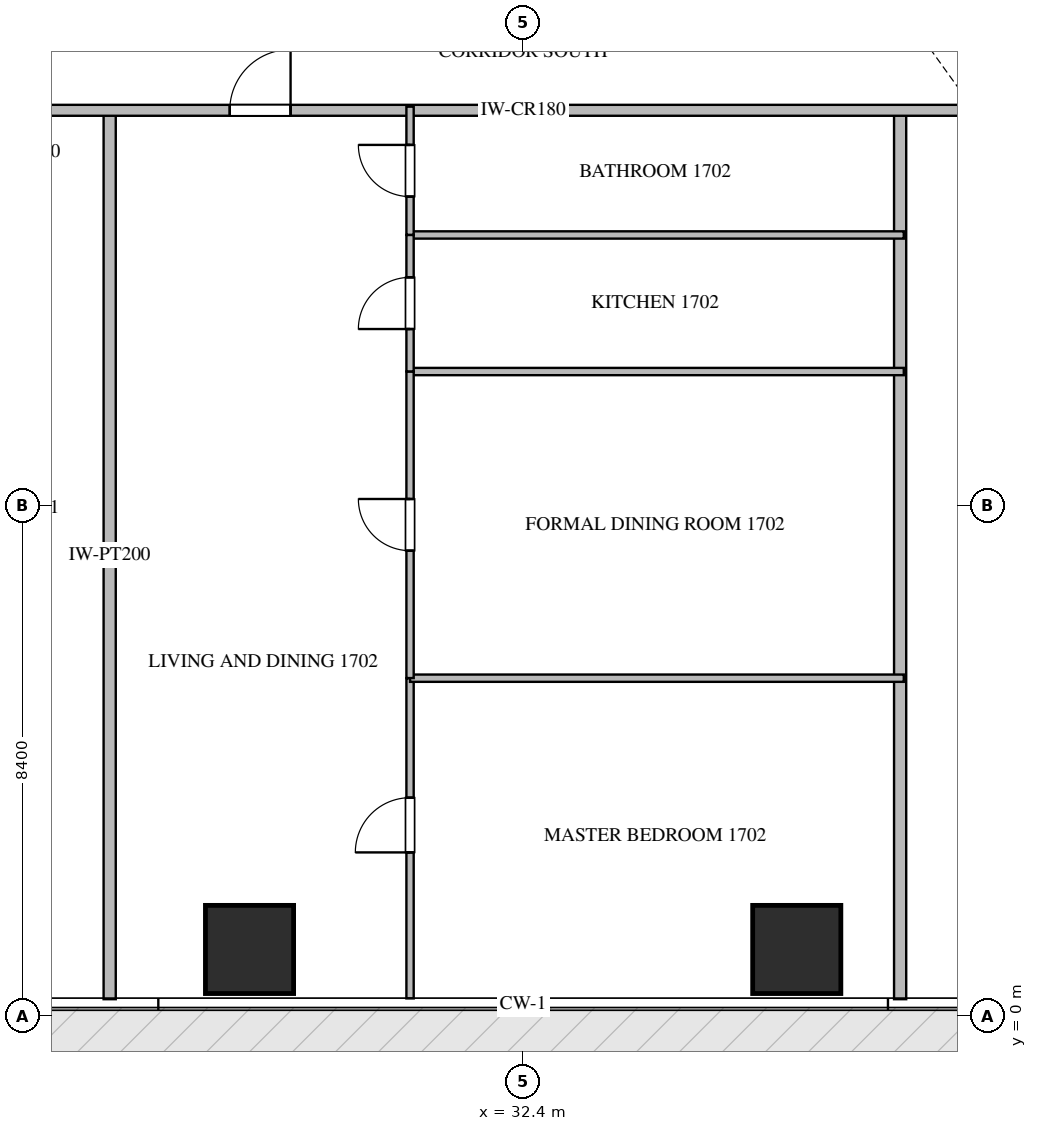
"""IFC4 building model, lengths in metres.
Left out: names, types, materials, properties, quantities, classifications, styles, units other than length and angle.
Written with IfcOpenShell. Run it as: python <this file> out.ifc"""

import sys

from ifc_helpers import new_model, si_unit, direction, frame, frame_2d, origin, origin_2d, place, context, subcontext, project, spatial, rectangle, extrude, source, transform, mapped, element, fill, save


model = new_model("IFC4")
c1 = context("Model", 3, precision=1e-05, world=origin(), true_north=direction((0.0, 1.0)))
c2 = subcontext(c1, "Body", "Model", "MODEL_VIEW")
j1 = project(units=[si_unit("LENGTHUNIT", "METRE"), si_unit("PLANEANGLEUNIT", "RADIAN")], contexts=[c1])
p1 = place(None, origin())
s1 = spatial("IfcSite", under=j1, at=p1, CompositionType="ELEMENT")
p2 = place(p1, origin())
s2 = spatial("IfcBuilding", under=s1, at=p2, CompositionType="ELEMENT")
p3 = place(p2, frame((0.0, 0.0, 71.7)))
s3 = spatial("IfcBuildingStorey", under=s2, at=p3, CompositionType="ELEMENT", Elevation=71.7)
m1 = source(origin(), c2, "Body", "SweptSolid", [
    extrude(rectangle(XDim=1.45, YDim=1.45, at=origin_2d()), origin(), (0.0, 0.0, 1.0), 3.75),
])
for number, where, z_axis, x_axis in (
    (1, (27.9, 1.1, -0.26), (0.0, 0.0, 1.0), (1.0, 0.0, 0.0)),
    (2, (36.9, 1.1, -0.26), (0.0, 0.0, 1.0), (1.0, 0.0, 0.0)),
):
    element("IfcColumn", number, at=place(p3, frame(where, z_axis=z_axis, x_axis=x_axis)), inside=s3, PredefinedType="COLUMN", context=c2, shape_type="MappedRepresentation", body=[
        mapped(m1, transform((0.0, 0.0, 0.0), scale=1.0)),
    ])
for number, where, z_axis, x_axis in (
    (3, (25.6, 0.282, 0.0), (0.0, 0.0, 1.0), (0.0, 1.0, 0.0)),
    (4, (38.6, 0.282, 0.0), (0.0, 0.0, 1.0), (0.0, 1.0, 0.0)),
):
    element("IfcWall", number, at=place(p3, frame(where, z_axis=z_axis, x_axis=x_axis)), inside=s3, PredefinedType="PARTITIONING", context=c2, shape_type="SweptSolid", body=[
        extrude(rectangle(XDim=14.618, YDim=0.2, at=frame_2d((7.309, 0.0))), origin(), (0.0, 0.0, 1.0), 3.49),
    ])
p4 = place(p3, frame((21.402, 14.9, 0.0), z_axis=(0.0, 0.0, 1.0), x_axis=(1.0, 0.0, 0.0)))
e5 = element("IfcWall", 5, at=p4, inside=s3, PredefinedType="PARTITIONING", context=c2, shape_type="SweptSolid", body=[
    extrude(rectangle(XDim=21.996, YDim=0.18, at=frame_2d((10.998, 0.0))), origin(), (0.0, 0.0, 1.0), 3.49),
])
p5 = place(p4, frame((2.1, 0.0, 0.0)))
e6 = element("IfcOpeningElement", 6, at=p5, cuts=e5, PredefinedType="OPENING", context=c2, shape_type="SweptSolid", body=[
    extrude(rectangle(XDim=1.0, YDim=2.15, at=frame_2d((0.5, 1.075))), frame((0.0, 0.1, 0.0), z_axis=(0.0, -1.0, 0.0), x_axis=(1.0, 0.0, 0.0)), (0.0, 0.0, 1.0), 0.2),
])
p6 = place(p4, frame((6.173, 0.0, 0.0)))
e7 = element("IfcOpeningElement", 7, at=p6, cuts=e5, PredefinedType="OPENING", context=c2, shape_type="SweptSolid", body=[
    extrude(rectangle(XDim=1.0, YDim=2.15, at=frame_2d((0.5, 1.075))), frame((0.0, 0.1, 0.0), z_axis=(0.0, -1.0, 0.0), x_axis=(1.0, 0.0, 0.0)), (0.0, 0.0, 1.0), 0.2),
])
p7 = place(p4, frame((18.896, 0.0, 0.0)))
e8 = element("IfcOpeningElement", 8, at=p7, cuts=e5, PredefinedType="OPENING", context=c2, shape_type="SweptSolid", body=[
    extrude(rectangle(XDim=1.0, YDim=2.15, at=frame_2d((0.5, 1.075))), frame((0.0, 0.1, 0.0), z_axis=(0.0, -1.0, 0.0), x_axis=(1.0, 0.0, 0.0)), (0.0, 0.0, 1.0), 0.2),
])
p8 = place(p3, frame((30.54, 0.295, 0.0), z_axis=(0.0, 0.0, 1.0), x_axis=(0.0, 1.0, 0.0)))
e9 = element("IfcWall", 9, at=p8, inside=s3, PredefinedType="PARTITIONING", context=c2, shape_type="SweptSolid", body=[
    extrude(rectangle(XDim=5.266, YDim=0.12, at=frame_2d((2.633, 0.0))), origin(), (0.0, 0.0, 1.0), 3.49),
])
p9 = place(p8, frame((2.401, 0.0, 0.0)))
e10 = element("IfcOpeningElement", 10, at=p9, cuts=e9, PredefinedType="OPENING", context=c2, shape_type="SweptSolid", body=[
    extrude(rectangle(XDim=0.9, YDim=2.1, at=frame_2d((0.45, 1.05))), frame((0.0, 0.07, 0.0), z_axis=(0.0, -1.0, 0.0), x_axis=(1.0, 0.0, 0.0)), (0.0, 0.0, 1.0), 0.14),
])
for number, where, z_axis, x_axis in (
    (11, (30.54, 5.561, 0.0), (0.0, 0.0, 1.0), (1.0, 0.0, 0.0)),
    (12, (30.54, 10.604, 0.0), (0.0, 0.0, 1.0), (1.0, 0.0, 0.0)),
    (13, (30.54, 12.85, 0.0), (0.0, 0.0, 1.0), (1.0, 0.0, 0.0)),
):
    element("IfcWall", number, at=place(p3, frame(where, z_axis=z_axis, x_axis=x_axis)), inside=s3, PredefinedType="PARTITIONING", context=c2, shape_type="SweptSolid", body=[
        extrude(rectangle(XDim=8.12, YDim=0.12, at=frame_2d((4.06, 0.0))), origin(), (0.0, 0.0, 1.0), 3.49),
    ])
p10 = place(p3, frame((30.54, 5.563, 0.0), z_axis=(0.0, 0.0, 1.0), x_axis=(0.0, 1.0, 0.0)))
e14 = element("IfcWall", 14, at=p10, inside=s3, PredefinedType="PARTITIONING", context=c2, shape_type="SweptSolid", body=[
    extrude(rectangle(XDim=5.041, YDim=0.12, at=frame_2d((2.521, 0.0))), origin(), (0.0, 0.0, 1.0), 3.49),
])
p11 = place(p10, frame((2.095, 0.0, 0.0)))
e15 = element("IfcOpeningElement", 15, at=p11, cuts=e14, PredefinedType="OPENING", context=c2, shape_type="SweptSolid", body=[
    extrude(rectangle(XDim=0.85, YDim=2.1, at=frame_2d((0.425, 1.05))), frame((0.0, 0.07, 0.0), z_axis=(0.0, -1.0, 0.0), x_axis=(1.0, 0.0, 0.0)), (0.0, 0.0, 1.0), 0.14),
])
p12 = place(p3, frame((30.54, 10.606, 0.0), z_axis=(0.0, 0.0, 1.0), x_axis=(0.0, 1.0, 0.0)))
e16 = element("IfcWall", 16, at=p12, inside=s3, PredefinedType="PARTITIONING", context=c2, shape_type="SweptSolid", body=[
    extrude(rectangle(XDim=2.244, YDim=0.12, at=frame_2d((1.122, 0.0))), origin(), (0.0, 0.0, 1.0), 3.49),
])
p13 = place(p12, frame((0.697, 0.0, 0.0)))
e17 = element("IfcOpeningElement", 17, at=p13, cuts=e16, PredefinedType="OPENING", context=c2, shape_type="SweptSolid", body=[
    extrude(rectangle(XDim=0.85, YDim=2.1, at=frame_2d((0.425, 1.05))), frame((0.0, 0.07, 0.0), z_axis=(0.0, -1.0, 0.0), x_axis=(1.0, 0.0, 0.0)), (0.0, 0.0, 1.0), 0.14),
])
p14 = place(p3, frame((30.54, 12.852, 0.0), z_axis=(0.0, 0.0, 1.0), x_axis=(0.0, 1.0, 0.0)))
e18 = element("IfcWall", 18, at=p14, inside=s3, PredefinedType="PARTITIONING", context=c2, shape_type="SweptSolid", body=[
    extrude(rectangle(XDim=2.108, YDim=0.12, at=frame_2d((1.054, 0.0))), origin(), (0.0, 0.0, 1.0), 3.49),
])
p15 = place(p14, frame((0.629, 0.0, 0.0)))
e19 = element("IfcOpeningElement", 19, at=p15, cuts=e18, PredefinedType="OPENING", context=c2, shape_type="SweptSolid", body=[
    extrude(rectangle(XDim=0.85, YDim=2.1, at=frame_2d((0.425, 1.05))), frame((0.0, 0.07, 0.0), z_axis=(0.0, -1.0, 0.0), x_axis=(1.0, 0.0, 0.0)), (0.0, 0.0, 1.0), 0.14),
])
m2 = source(origin(), c2, "Body", "SweptSolid", [
    extrude(rectangle(XDim=1.0, YDim=2.15, at=frame_2d((0.5, 1.075))), frame((0.0, 0.025, 0.0), z_axis=(0.0, -1.0, 0.0), x_axis=(1.0, 0.0, 0.0)), (0.0, 0.0, 1.0), 0.05),
])
p16 = place(p6, origin())
e20 = element("IfcDoor", 20, at=p16, inside=s3, OperationType="SINGLE_SWING_RIGHT", PredefinedType="DOOR", context=c2, shape_type="MappedRepresentation", body=[
    mapped(m2, transform((0.0, 0.0, 0.0), scale=1.0)),
])
fill(e7, e20)
m3 = source(origin(), c2, "Body", "SweptSolid", [
    extrude(rectangle(XDim=0.9, YDim=2.1, at=frame_2d((0.45, 1.05))), frame((0.0, 0.025, 0.0), z_axis=(0.0, -1.0, 0.0), x_axis=(1.0, 0.0, 0.0)), (0.0, 0.0, 1.0), 0.05),
])
p17 = place(p9, origin())
e21 = element("IfcDoor", 21, at=p17, inside=s3, OperationType="SINGLE_SWING_LEFT", PredefinedType="DOOR", context=c2, shape_type="MappedRepresentation", body=[
    mapped(m3, transform((0.0, 0.0, 0.0), scale=1.0)),
])
fill(e10, e21)
m4 = source(origin(), c2, "Body", "SweptSolid", [
    extrude(rectangle(XDim=0.85, YDim=2.1, at=frame_2d((0.425, 1.05))), frame((0.0, 0.025, 0.0), z_axis=(0.0, -1.0, 0.0), x_axis=(1.0, 0.0, 0.0)), (0.0, 0.0, 1.0), 0.05),
])
p18 = place(p11, origin())
e22 = element("IfcDoor", 22, at=p18, inside=s3, OperationType="SINGLE_SWING_RIGHT", PredefinedType="DOOR", context=c2, shape_type="MappedRepresentation", body=[
    mapped(m4, transform((0.0, 0.0, 0.0), scale=1.0)),
])
fill(e15, e22)
p19 = place(p13, origin())
e23 = element("IfcDoor", 23, at=p19, inside=s3, OperationType="SINGLE_SWING_LEFT", PredefinedType="DOOR", context=c2, shape_type="MappedRepresentation", body=[
    mapped(m4, transform((0.0, 0.0, 0.0), scale=1.0)),
])
fill(e17, e23)
p20 = place(p15, origin())
e24 = element("IfcDoor", 24, at=p20, inside=s3, OperationType="SINGLE_SWING_RIGHT", PredefinedType="DOOR", context=c2, shape_type="MappedRepresentation", body=[
    mapped(m4, transform((0.0, 0.0, 0.0), scale=1.0)),
])
fill(e19, e24)
save(model, sys.argv[1])
